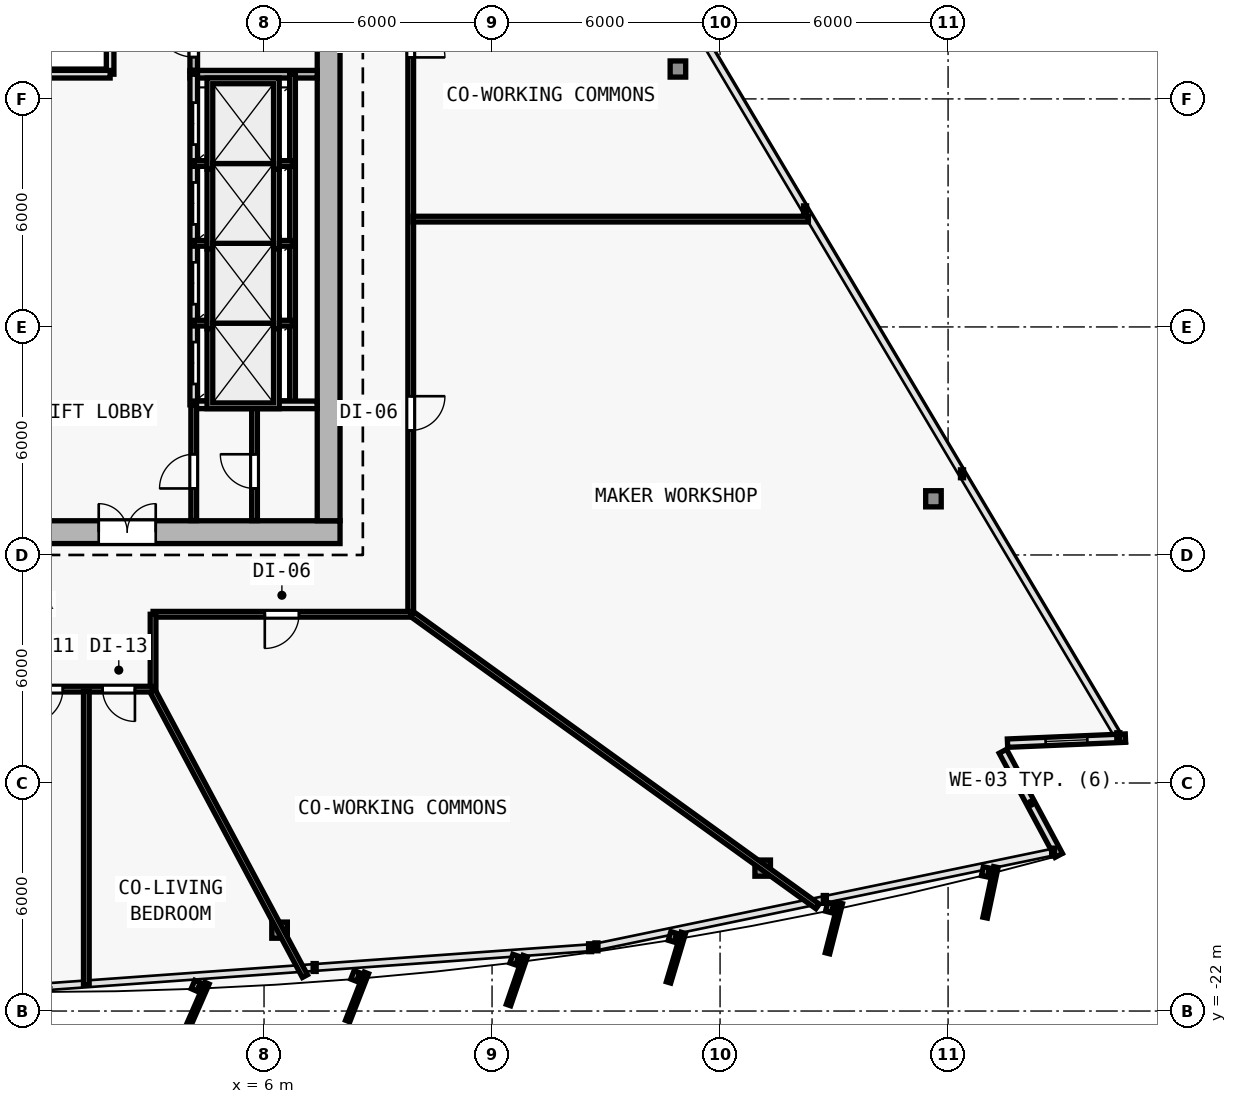
"""IFC4 building model, lengths in metres.
Left out: names, types, materials, properties, quantities, classifications, styles, units other than length and angle.
Written with IfcOpenShell. Run it as: python <this file> out.ifc"""

import sys

from ifc_helpers import new_model, si_unit, direction, frame, frame_2d, origin, origin_2d, place, context, subcontext, project, spatial, rectangle, i_section, extrude, element, fill, save


model = new_model("IFC4")
c1 = context("Model", 3, precision=1e-05, world=origin(), true_north=direction((0.0, 1.0)))
c2 = subcontext(c1, "Body", "Model", "MODEL_VIEW")
j1 = project(units=[si_unit("LENGTHUNIT", "METRE"), si_unit("PLANEANGLEUNIT", "RADIAN")], contexts=[c1])
p1 = place(None, origin())
s1 = spatial("IfcSite", under=j1, at=p1, CompositionType="ELEMENT")
p2 = place(p1, origin())
s2 = spatial("IfcBuilding", under=s1, at=p2, CompositionType="ELEMENT")
p3 = place(p2, frame((0.0, 0.0, 89.7)))
s3 = spatial("IfcBuildingStorey", under=s2, at=p3, CompositionType="ELEMENT", Elevation=89.7)
for number, where, z_axis, x_axis in (
    (1, (7.7, -9.4, 0.0), (0.0, 0.0, 1.0), (1.0, 0.0, 0.0)),
    (2, (7.7, 0.4, 0.0), (0.0, 0.0, 1.0), (1.0, 0.0, 0.0)),
):
    element("IfcColumn", number, at=place(p3, frame(where, z_axis=z_axis, x_axis=x_axis)), inside=s3, PredefinedType="COLUMN", context=c2, shape_type="SweptSolid", body=[
        extrude(i_section(OverallWidth=0.409, OverallDepth=0.425, WebThickness=0.021, FlangeThickness=0.034, FilletRadius=0.015, at=origin_2d()), origin(), (0.0, 0.0, 1.0), 3.6),
    ])
p4 = place(p3, frame((6.409, -19.872, 0.006), z_axis=(-0.006934288159, 0.035283289748, 0.999353293441), x_axis=(-0.981229659911, -0.192842823335, 0.0)))
e3 = element("IfcColumn", 3, at=p4, inside=s3, PredefinedType="COLUMN", context=c2, shape_type="SweptSolid", body=[
    extrude(i_section(OverallWidth=0.409, OverallDepth=0.425, WebThickness=0.021, FlangeThickness=0.034, FilletRadius=0.015, at=origin_2d()), origin(), (0.0, 0.0, 1.0), 3.591),
])
p5 = place(p3, frame((19.121, -18.24, 0.006), z_axis=(-0.020596339702, 0.033443561496, 0.99922836178), x_axis=(-0.851480003019, -0.52438707503, 0.0)))
e4 = element("IfcColumn", 4, at=p5, inside=s3, PredefinedType="COLUMN", context=c2, shape_type="SweptSolid", body=[
    extrude(i_section(OverallWidth=0.409, OverallDepth=0.425, WebThickness=0.021, FlangeThickness=0.034, FilletRadius=0.015, at=origin_2d()), origin(), (0.0, 0.0, 1.0), 3.592),
])
p6 = place(p3, frame((23.615, -8.522, 0.006), z_axis=(-0.026107436898, 0.021620221181, 0.999425318758), x_axis=(-0.637813971185, -0.770190455771, 0.0)))
e5 = element("IfcColumn", 5, at=p6, inside=s3, PredefinedType="COLUMN", context=c2, shape_type="SweptSolid", body=[
    extrude(i_section(OverallWidth=0.409, OverallDepth=0.425, WebThickness=0.021, FlangeThickness=0.034, FilletRadius=0.015, at=origin_2d()), origin(), (0.0, 0.0, 1.0), 3.591),
])
p7 = place(p3, frame((16.891, 2.787, 0.006), z_axis=(-0.018907326549, 0.00952167524, 0.999775900241), x_axis=(-0.449781931574, -0.893138406984, 0.0)))
e6 = element("IfcColumn", 6, at=p7, inside=s3, PredefinedType="COLUMN", context=c2, shape_type="SweptSolid", body=[
    extrude(i_section(OverallWidth=0.409, OverallDepth=0.425, WebThickness=0.021, FlangeThickness=0.034, FilletRadius=0.015, at=origin_2d()), origin(), (0.0, 0.0, 1.0), 3.59),
])
p8 = place(p3, frame((25.442, -15.165, 0.0), z_axis=(0.0, 0.0, 1.0), x_axis=(0.472811757317, -0.881163459378, 0.0)))
e7 = element("IfcWall", 7, at=p8, inside=s3, PredefinedType="SOLIDWALL", context=c2, shape_type="SweptSolid", body=[
    extrude(rectangle(XDim=3.11, YDim=0.22, at=frame_2d((1.555, 0.0))), origin(), (0.0, 0.0, 1.0), 3.35),
])
p9 = place(p3, frame((28.667, -14.819, 0.0), z_axis=(0.0, 0.0, 1.0), x_axis=(-0.99909228571, -0.042598176436, 0.0)))
e8 = element("IfcWall", 8, at=p9, inside=s3, PredefinedType="SOLIDWALL", context=c2, shape_type="SweptSolid", body=[
    extrude(rectangle(XDim=3.106, YDim=0.22, at=frame_2d((1.553, 0.0))), origin(), (0.0, 0.0, 1.0), 3.35),
])
p10 = place(p9, frame((1.003, 0.0, 0.62)))
e9 = element("IfcOpeningElement", 9, at=p10, cuts=e8, PredefinedType="OPENING", context=c2, shape_type="SweptSolid", body=[
    extrude(rectangle(XDim=1.1, YDim=1.8, at=frame_2d((0.55, 0.9))), frame((0.0, 0.12, 0.0), z_axis=(0.0, -1.0, 0.0), x_axis=(1.0, 0.0, 0.0)), (0.0, 0.0, 1.0), 0.24),
])
p11 = place(p3, frame((-8.0, -9.4, 0.0), z_axis=(0.0, 0.0, 1.0), x_axis=(1.0, 0.0, 0.0)))
e10 = element("IfcWall", 10, at=p11, inside=s3, PredefinedType="SHEAR", context=c2, shape_type="SweptSolid", body=[
    extrude(rectangle(XDim=16.0, YDim=0.6, at=frame_2d((8.0, 0.0))), origin(), (0.0, 0.0, 1.0), 3.35),
])
p12 = place(p11, frame((9.65, 0.0, 0.0)))
e11 = element("IfcOpeningElement", 11, at=p12, cuts=e10, PredefinedType="OPENING", context=c2, shape_type="SweptSolid", body=[
    extrude(rectangle(XDim=1.5, YDim=2.2, at=frame_2d((0.75, 1.1))), frame((0.0, 0.31, 0.0), z_axis=(0.0, -1.0, 0.0), x_axis=(1.0, 0.0, 0.0)), (0.0, 0.0, 1.0), 0.62),
])
p13 = place(p3, frame((7.7, 9.9, 0.0), z_axis=(0.0, 0.0, 1.0), x_axis=(0.0, -1.0, 0.0)))
e12 = element("IfcWall", 12, at=p13, inside=s3, PredefinedType="SHEAR", context=c2, shape_type="SweptSolid", body=[
    extrude(rectangle(XDim=19.0, YDim=0.6, at=frame_2d((9.5, 0.0))), origin(), (0.0, 0.0, 1.0), 3.35),
])
p14 = place(p3, frame((4.15, 2.75, 0.0), z_axis=(0.0, 0.0, 1.0), x_axis=(0.0, 1.0, 0.0)))
e13 = element("IfcWall", 13, at=p14, inside=s3, PredefinedType="SOLIDWALL", context=c2, shape_type="SweptSolid", body=[
    extrude(rectangle(XDim=7.15, YDim=0.2, at=frame_2d((3.575, 0.0))), origin(), (0.0, 0.0, 1.0), 3.35),
])
p15 = place(p14, frame((0.35, 0.0, 0.0)))
e14 = element("IfcOpeningElement", 14, at=p15, cuts=e13, PredefinedType="OPENING", context=c2, shape_type="SweptSolid", body=[
    extrude(rectangle(XDim=1.0, YDim=2.15, at=frame_2d((0.5, 1.075))), frame((0.0, 0.11, 0.0), z_axis=(0.0, -1.0, 0.0), x_axis=(1.0, 0.0, 0.0)), (0.0, 0.0, 1.0), 0.22),
])
p16 = place(p3, frame((4.05, 2.65, 0.0), z_axis=(0.0, 0.0, 1.0), x_axis=(1.0, 0.0, 0.0)))
e15 = element("IfcWall", 15, at=p16, inside=s3, PredefinedType="SOLIDWALL", context=c2, shape_type="SweptSolid", body=[
    extrude(rectangle(XDim=3.35, YDim=0.2, at=frame_2d((1.675, 0.0))), origin(), (0.0, 0.0, 1.0), 3.35),
])
p17 = place(p3, frame((4.15, -6.05, 0.0), z_axis=(0.0, 0.0, 1.0), x_axis=(0.0, 1.0, 0.0)))
e16 = element("IfcWall", 16, at=p17, inside=s3, PredefinedType="SOLIDWALL", context=c2, shape_type="SweptSolid", body=[
    extrude(rectangle(XDim=8.7, YDim=0.2, at=frame_2d((4.35, 0.0))), origin(), (0.0, 0.0, 1.0), 3.35),
])
p18 = place(p17, frame((0.55, 0.0, 0.0)))
e17 = element("IfcOpeningElement", 17, at=p18, cuts=e16, PredefinedType="OPENING", context=c2, shape_type="SweptSolid", body=[
    extrude(rectangle(XDim=1.1, YDim=2.15, at=frame_2d((0.55, 1.075))), frame((0.0, 0.11, 0.0), z_axis=(0.0, -1.0, 0.0), x_axis=(1.0, 0.0, 0.0)), (0.0, 0.0, 1.0), 0.22),
])
p19 = place(p17, frame((2.65, 0.0, 0.0)))
e18 = element("IfcOpeningElement", 18, at=p19, cuts=e16, PredefinedType="OPENING", context=c2, shape_type="SweptSolid", body=[
    extrude(rectangle(XDim=1.1, YDim=2.15, at=frame_2d((0.55, 1.075))), frame((0.0, 0.11, 0.0), z_axis=(0.0, -1.0, 0.0), x_axis=(1.0, 0.0, 0.0)), (0.0, 0.0, 1.0), 0.22),
])
p20 = place(p17, frame((4.75, 0.0, 0.0)))
e19 = element("IfcOpeningElement", 19, at=p20, cuts=e16, PredefinedType="OPENING", context=c2, shape_type="SweptSolid", body=[
    extrude(rectangle(XDim=1.1, YDim=2.15, at=frame_2d((0.55, 1.075))), frame((0.0, 0.11, 0.0), z_axis=(0.0, -1.0, 0.0), x_axis=(1.0, 0.0, 0.0)), (0.0, 0.0, 1.0), 0.22),
])
p21 = place(p17, frame((6.85, 0.0, 0.0)))
e20 = element("IfcOpeningElement", 20, at=p21, cuts=e16, PredefinedType="OPENING", context=c2, shape_type="SweptSolid", body=[
    extrude(rectangle(XDim=1.1, YDim=2.15, at=frame_2d((0.55, 1.075))), frame((0.0, 0.11, 0.0), z_axis=(0.0, -1.0, 0.0), x_axis=(1.0, 0.0, 0.0)), (0.0, 0.0, 1.0), 0.22),
])
p22 = place(p3, frame((6.75, -6.05, 0.0), z_axis=(0.0, 0.0, 1.0), x_axis=(0.0, 1.0, 0.0)))
e21 = element("IfcWall", 21, at=p22, inside=s3, PredefinedType="PARTITIONING", context=c2, shape_type="SweptSolid", body=[
    extrude(rectangle(XDim=8.7, YDim=0.15, at=frame_2d((4.35, 0.0))), origin(), (0.0, 0.0, 1.0), 3.35),
])
for number, where, z_axis, x_axis in (
    (22, (4.15, -3.9, 0.0), (0.0, 0.0, 1.0), (1.0, 0.0, 0.0)),
    (23, (4.15, -1.8, 0.0), (0.0, 0.0, 1.0), (1.0, 0.0, 0.0)),
    (24, (4.15, 0.3, 0.0), (0.0, 0.0, 1.0), (1.0, 0.0, 0.0)),
):
    element("IfcWall", number, at=place(p3, frame(where, z_axis=z_axis, x_axis=x_axis)), inside=s3, PredefinedType="PARTITIONING", context=c2, shape_type="SweptSolid", body=[
        extrude(rectangle(XDim=2.6, YDim=0.15, at=frame_2d((1.3, 0.0))), origin(), (0.0, 0.0, 1.0), 3.35),
    ])
p23 = place(p3, frame((1.95, 2.65, 0.0), z_axis=(0.0, 0.0, 1.0), x_axis=(0.0, 1.0, 0.0)))
e25 = element("IfcWall", 25, at=p23, inside=s3, PredefinedType="SOLIDWALL", context=c2, shape_type="SweptSolid", body=[
    extrude(rectangle(XDim=7.245, YDim=0.2, at=frame_2d((3.623, 0.0))), origin(), (0.0, 0.0, 1.0), 3.35),
])
p24 = place(p3, frame((-0.95, 2.65, 0.0), z_axis=(0.0, 0.0, 1.0), x_axis=(1.0, 0.0, 0.0)))
e26 = element("IfcWall", 26, at=p24, inside=s3, PredefinedType="SOLIDWALL", context=c2, shape_type="SweptSolid", body=[
    extrude(rectangle(XDim=2.9, YDim=0.2, at=frame_2d((1.45, 0.0))), origin(), (0.0, 0.0, 1.0), 3.35),
])
p25 = place(p3, frame((4.15, -6.05, 0.0), z_axis=(0.0, 0.0, 1.0), x_axis=(1.0, 0.0, 0.0)))
e27 = element("IfcWall", 27, at=p25, inside=s3, PredefinedType="SOLIDWALL", context=c2, shape_type="SweptSolid", body=[
    extrude(rectangle(XDim=3.245, YDim=0.2, at=frame_2d((1.623, 0.0))), origin(), (0.0, 0.0, 1.0), 3.35),
])
p26 = place(p3, frame((4.15, -9.095, 0.0), z_axis=(0.0, 0.0, 1.0), x_axis=(0.0, 1.0, 0.0)))
e28 = element("IfcWall", 28, at=p26, inside=s3, PredefinedType="PARTITIONING", context=c2, shape_type="SweptSolid", body=[
    extrude(rectangle(XDim=3.045, YDim=0.15, at=frame_2d((1.522, 0.0))), origin(), (0.0, 0.0, 1.0), 3.35),
])
p27 = place(p26, frame((0.845, 0.0, 0.0)))
e29 = element("IfcOpeningElement", 29, at=p27, cuts=e28, PredefinedType="OPENING", context=c2, shape_type="SweptSolid", body=[
    extrude(rectangle(XDim=0.9, YDim=2.1, at=frame_2d((0.45, 1.05))), frame((0.0, 0.085, 0.0), z_axis=(0.0, -1.0, 0.0), x_axis=(1.0, 0.0, 0.0)), (0.0, 0.0, 1.0), 0.17),
])
p28 = place(p3, frame((5.75, -9.095, 0.0), z_axis=(0.0, 0.0, 1.0), x_axis=(0.0, 1.0, 0.0)))
e30 = element("IfcWall", 30, at=p28, inside=s3, PredefinedType="PARTITIONING", context=c2, shape_type="SweptSolid", body=[
    extrude(rectangle(XDim=3.045, YDim=0.15, at=frame_2d((1.522, 0.0))), origin(), (0.0, 0.0, 1.0), 3.35),
])
p29 = place(p28, frame((0.845, 0.0, 0.0)))
e31 = element("IfcOpeningElement", 31, at=p29, cuts=e30, PredefinedType="OPENING", context=c2, shape_type="SweptSolid", body=[
    extrude(rectangle(XDim=0.9, YDim=2.1, at=frame_2d((0.45, 1.05))), frame((0.0, 0.085, 0.0), z_axis=(0.0, -1.0, 0.0), x_axis=(1.0, 0.0, 0.0)), (0.0, 0.0, 1.0), 0.17),
])
p30 = place(p3, frame((9.86, 8.426, 0.0), z_axis=(0.0, 0.0, 1.0), x_axis=(0.0, -1.0, 0.0)))
e32 = element("IfcWall", 32, at=p30, inside=s3, PredefinedType="PARTITIONING", context=c2, shape_type="SweptSolid", body=[
    extrude(rectangle(XDim=19.986, YDim=0.15, at=frame_2d((9.993, 0.0))), origin(), (0.0, 0.0, 1.0), 2.609),
])
p31 = place(p30, frame((14.248, 0.0, 0.0)))
e33 = element("IfcOpeningElement", 33, at=p31, cuts=e32, PredefinedType="OPENING", context=c2, shape_type="SweptSolid", body=[
    extrude(rectangle(XDim=0.9, YDim=2.1, at=frame_2d((0.45, 1.05))), frame((0.0, 0.085, 0.0), z_axis=(0.0, -1.0, 0.0), x_axis=(1.0, 0.0, 0.0)), (0.0, 0.0, 1.0), 0.17),
])
p32 = place(p30, frame((4.434, 0.0, 0.0)))
e34 = element("IfcOpeningElement", 34, at=p32, cuts=e32, PredefinedType="OPENING", context=c2, shape_type="SweptSolid", body=[
    extrude(rectangle(XDim=0.9, YDim=2.1, at=frame_2d((0.45, 1.05))), frame((0.0, 0.085, 0.0), z_axis=(0.0, -1.0, 0.0), x_axis=(1.0, 0.0, 0.0)), (0.0, 0.0, 1.0), 0.17),
])
p33 = place(p3, frame((9.86, -11.56, 0.0), z_axis=(0.0, 0.0, 1.0), x_axis=(-1.0, 0.0, 0.0)))
e35 = element("IfcWall", 35, at=p33, inside=s3, PredefinedType="PARTITIONING", context=c2, shape_type="SweptSolid", body=[
    extrude(rectangle(XDim=6.78, YDim=0.15, at=frame_2d((3.39, 0.0))), origin(), (0.0, 0.0, 1.0), 2.775),
])
p34 = place(p33, frame((2.94, 0.0, 0.0)))
e36 = element("IfcOpeningElement", 36, at=p34, cuts=e35, PredefinedType="OPENING", context=c2, shape_type="SweptSolid", body=[
    extrude(rectangle(XDim=0.9, YDim=2.1, at=frame_2d((0.45, 1.05))), frame((0.0, 0.085, 0.0), z_axis=(0.0, -1.0, 0.0), x_axis=(1.0, 0.0, 0.0)), (0.0, 0.0, 1.0), 0.17),
])
p35 = place(p3, frame((3.08, -11.56, 0.0), z_axis=(0.0, 0.0, 1.0), x_axis=(0.0, -1.0, 0.0)))
e37 = element("IfcWall", 37, at=p35, inside=s3, PredefinedType="PARTITIONING", context=c2, shape_type="SweptSolid", body=[
    extrude(rectangle(XDim=1.97, YDim=0.15, at=frame_2d((0.985, 0.0))), origin(), (0.0, 0.0, 1.0), 2.775),
])
p36 = place(p3, frame((3.08, -13.53, 0.0), z_axis=(0.0, 0.0, 1.0), x_axis=(-1.0, 0.0, 0.0)))
e38 = element("IfcWall", 38, at=p36, inside=s3, PredefinedType="PARTITIONING", context=c2, shape_type="SweptSolid", body=[
    extrude(rectangle(XDim=6.16, YDim=0.15, at=frame_2d((3.08, 0.0))), origin(), (0.0, 0.0, 1.0), 2.725),
])
p37 = place(p36, frame((4.487, 0.0, 0.0)))
e39 = element("IfcOpeningElement", 39, at=p37, cuts=e38, PredefinedType="OPENING", context=c2, shape_type="SweptSolid", body=[
    extrude(rectangle(XDim=0.9, YDim=2.1, at=frame_2d((0.45, 1.05))), frame((0.0, 0.085, 0.0), z_axis=(0.0, -1.0, 0.0), x_axis=(1.0, 0.0, 0.0)), (0.0, 0.0, 1.0), 0.17),
])
p38 = place(p36, frame((2.374, 0.0, 0.0)))
e40 = element("IfcOpeningElement", 40, at=p38, cuts=e38, PredefinedType="OPENING", context=c2, shape_type="SweptSolid", body=[
    extrude(rectangle(XDim=0.9, YDim=2.1, at=frame_2d((0.45, 1.05))), frame((0.0, 0.085, 0.0), z_axis=(0.0, -1.0, 0.0), x_axis=(1.0, 0.0, 0.0)), (0.0, 0.0, 1.0), 0.17),
])
p39 = place(p36, frame((0.477, 0.0, 0.0)))
e41 = element("IfcOpeningElement", 41, at=p39, cuts=e38, PredefinedType="OPENING", context=c2, shape_type="SweptSolid", body=[
    extrude(rectangle(XDim=0.85, YDim=2.1, at=frame_2d((0.425, 1.05))), frame((0.0, 0.085, 0.0), z_axis=(0.0, -1.0, 0.0), x_axis=(1.0, 0.0, 0.0)), (0.0, 0.0, 1.0), 0.17),
])
p40 = place(p3, frame((3.066, -13.573, 0.0), z_axis=(0.0, 0.0, 1.0), x_axis=(0.471121088046, -0.882068546315, 0.0)))
e42 = element("IfcWall", 42, at=p40, inside=s3, PredefinedType="PARTITIONING", context=c2, shape_type="SweptSolid", body=[
    extrude(rectangle(XDim=8.512, YDim=0.15, at=frame_2d((4.256, 0.0))), origin(), (0.0, 0.0, 1.0), 2.725),
])
p41 = place(p3, frame((9.896, -11.558, 0.0), z_axis=(0.0, 0.0, 1.0), x_axis=(0.81126279066, -0.584681695019, 0.0)))
e43 = element("IfcWall", 43, at=p41, inside=s3, PredefinedType="PARTITIONING", context=c2, shape_type="SweptSolid", body=[
    extrude(rectangle(XDim=13.152, YDim=0.15, at=frame_2d((6.576, 0.0))), origin(), (0.0, 0.0, 1.0), 2.725),
])
p42 = place(p3, frame((1.324, -13.59, 0.0), z_axis=(0.0, 0.0, 1.0), x_axis=(0.0, -1.0, 0.0)))
e44 = element("IfcWall", 44, at=p42, inside=s3, PredefinedType="PARTITIONING", context=c2, shape_type="SweptSolid", body=[
    extrude(rectangle(XDim=7.727, YDim=0.15, at=frame_2d((3.864, 0.0))), origin(), (0.0, 0.0, 1.0), 2.835),
])
p43 = place(p3, frame((9.92, -1.163, 0.0), z_axis=(0.0, 0.0, 1.0), x_axis=(1.0, 0.0, 0.0)))
e45 = element("IfcWall", 45, at=p43, inside=s3, PredefinedType="PARTITIONING", context=c2, shape_type="SweptSolid", body=[
    extrude(rectangle(XDim=10.404, YDim=0.15, at=frame_2d((5.202, 0.0))), origin(), (0.0, 0.0, 1.0), 2.825),
])
p44 = place(p10, origin())
e46 = element("IfcWindow", 46, at=p44, inside=s3, PartitioningType="SINGLE_PANEL", PredefinedType="WINDOW", context=c2, shape_type="SweptSolid", body=[
    extrude(rectangle(XDim=1.1, YDim=1.8, at=frame_2d((0.55, 0.9))), frame((0.0, 0.03, 0.0), z_axis=(0.0, -1.0, 0.0), x_axis=(1.0, 0.0, 0.0)), (0.0, 0.0, 1.0), 0.06),
])
fill(e9, e46)
p45 = place(p12, origin())
e47 = element("IfcDoor", 47, at=p45, inside=s3, OperationType="DOUBLE_DOOR_SINGLE_SWING", PredefinedType="DOOR", context=c2, shape_type="SweptSolid", body=[
    extrude(rectangle(XDim=1.5, YDim=2.2, at=frame_2d((0.75, 1.1))), frame((0.0, 0.025, 0.0), z_axis=(0.0, -1.0, 0.0), x_axis=(1.0, 0.0, 0.0)), (0.0, 0.0, 1.0), 0.05),
])
fill(e11, e47)
p46 = place(p15, origin())
e48 = element("IfcDoor", 48, at=p46, inside=s3, OperationType="SINGLE_SWING_RIGHT", PredefinedType="DOOR", context=c2, shape_type="SweptSolid", body=[
    extrude(rectangle(XDim=1.0, YDim=2.15, at=frame_2d((0.5, 1.075))), frame((0.0, 0.025, 0.0), z_axis=(0.0, -1.0, 0.0), x_axis=(1.0, 0.0, 0.0)), (0.0, 0.0, 1.0), 0.05),
])
fill(e14, e48)
p47 = place(p18, origin())
e49 = element("IfcDoor", 49, at=p47, inside=s3, OperationType="DOUBLE_DOOR_SLIDING", PredefinedType="DOOR", context=c2, shape_type="SweptSolid", body=[
    extrude(rectangle(XDim=1.1, YDim=2.15, at=frame_2d((0.55, 1.075))), frame((0.0, 0.025, 0.0), z_axis=(0.0, -1.0, 0.0), x_axis=(1.0, 0.0, 0.0)), (0.0, 0.0, 1.0), 0.05),
])
fill(e17, e49)
p48 = place(p19, origin())
e50 = element("IfcDoor", 50, at=p48, inside=s3, OperationType="DOUBLE_DOOR_SLIDING", PredefinedType="DOOR", context=c2, shape_type="SweptSolid", body=[
    extrude(rectangle(XDim=1.1, YDim=2.15, at=frame_2d((0.55, 1.075))), frame((0.0, 0.025, 0.0), z_axis=(0.0, -1.0, 0.0), x_axis=(1.0, 0.0, 0.0)), (0.0, 0.0, 1.0), 0.05),
])
fill(e18, e50)
p49 = place(p20, origin())
e51 = element("IfcDoor", 51, at=p49, inside=s3, OperationType="DOUBLE_DOOR_SLIDING", PredefinedType="DOOR", context=c2, shape_type="SweptSolid", body=[
    extrude(rectangle(XDim=1.1, YDim=2.15, at=frame_2d((0.55, 1.075))), frame((0.0, 0.025, 0.0), z_axis=(0.0, -1.0, 0.0), x_axis=(1.0, 0.0, 0.0)), (0.0, 0.0, 1.0), 0.05),
])
fill(e19, e51)
p50 = place(p21, origin())
e52 = element("IfcDoor", 52, at=p50, inside=s3, OperationType="DOUBLE_DOOR_SLIDING", PredefinedType="DOOR", context=c2, shape_type="SweptSolid", body=[
    extrude(rectangle(XDim=1.1, YDim=2.15, at=frame_2d((0.55, 1.075))), frame((0.0, 0.025, 0.0), z_axis=(0.0, -1.0, 0.0), x_axis=(1.0, 0.0, 0.0)), (0.0, 0.0, 1.0), 0.05),
])
fill(e20, e52)
p51 = place(p27, origin())
e53 = element("IfcDoor", 53, at=p51, inside=s3, OperationType="SINGLE_SWING_LEFT", PredefinedType="DOOR", context=c2, shape_type="SweptSolid", body=[
    extrude(rectangle(XDim=0.9, YDim=2.1, at=frame_2d((0.45, 1.05))), frame((0.0, 0.025, 0.0), z_axis=(0.0, -1.0, 0.0), x_axis=(1.0, 0.0, 0.0)), (0.0, 0.0, 1.0), 0.05),
])
fill(e29, e53)
p52 = place(p29, origin())
e54 = element("IfcDoor", 54, at=p52, inside=s3, OperationType="SINGLE_SWING_RIGHT", PredefinedType="DOOR", context=c2, shape_type="SweptSolid", body=[
    extrude(rectangle(XDim=0.9, YDim=2.1, at=frame_2d((0.45, 1.05))), frame((0.0, 0.025, 0.0), z_axis=(0.0, -1.0, 0.0), x_axis=(1.0, 0.0, 0.0)), (0.0, 0.0, 1.0), 0.05),
])
fill(e31, e54)
p53 = place(p38, origin())
e55 = element("IfcDoor", 55, at=p53, inside=s3, OperationType="SINGLE_SWING_RIGHT", PredefinedType="DOOR", context=c2, shape_type="SweptSolid", body=[
    extrude(rectangle(XDim=0.9, YDim=2.1, at=frame_2d((0.45, 1.05))), frame((0.0, 0.025, 0.0), z_axis=(0.0, -1.0, 0.0), x_axis=(1.0, 0.0, 0.0)), (0.0, 0.0, 1.0), 0.05),
])
fill(e40, e55)
p54 = place(p39, origin())
e56 = element("IfcDoor", 56, at=p54, inside=s3, OperationType="SINGLE_SWING_LEFT", PredefinedType="DOOR", context=c2, shape_type="SweptSolid", body=[
    extrude(rectangle(XDim=0.85, YDim=2.1, at=frame_2d((0.425, 1.05))), frame((0.0, 0.025, 0.0), z_axis=(0.0, -1.0, 0.0), x_axis=(1.0, 0.0, 0.0)), (0.0, 0.0, 1.0), 0.05),
])
fill(e41, e56)
p55 = place(p34, origin())
e57 = element("IfcDoor", 57, at=p55, inside=s3, OperationType="SINGLE_SWING_RIGHT", PredefinedType="DOOR", context=c2, shape_type="SweptSolid", body=[
    extrude(rectangle(XDim=0.9, YDim=2.1, at=frame_2d((0.45, 1.05))), frame((0.0, 0.025, 0.0), z_axis=(0.0, -1.0, 0.0), x_axis=(1.0, 0.0, 0.0)), (0.0, 0.0, 1.0), 0.05),
])
fill(e36, e57)
p56 = place(p31, origin())
e58 = element("IfcDoor", 58, at=p56, inside=s3, OperationType="SINGLE_SWING_LEFT", PredefinedType="DOOR", context=c2, shape_type="SweptSolid", body=[
    extrude(rectangle(XDim=0.9, YDim=2.1, at=frame_2d((0.45, 1.05))), frame((0.0, 0.025, 0.0), z_axis=(0.0, -1.0, 0.0), x_axis=(1.0, 0.0, 0.0)), (0.0, 0.0, 1.0), 0.05),
])
fill(e33, e58)
p57 = place(p32, origin())
e59 = element("IfcDoor", 59, at=p57, inside=s3, OperationType="SINGLE_SWING_RIGHT", PredefinedType="DOOR", context=c2, shape_type="SweptSolid", body=[
    extrude(rectangle(XDim=0.9, YDim=2.1, at=frame_2d((0.45, 1.05))), frame((0.0, 0.025, 0.0), z_axis=(0.0, -1.0, 0.0), x_axis=(1.0, 0.0, 0.0)), (0.0, 0.0, 1.0), 0.05),
])
fill(e34, e59)
save(model, sys.argv[1])
